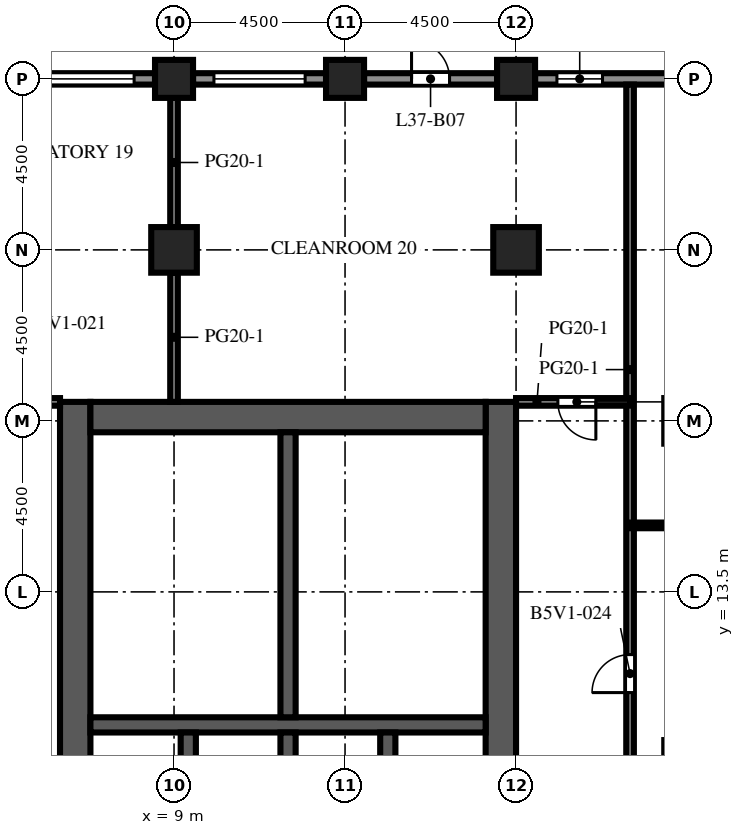
"""IFC4 building model, lengths in metres.
Left out: names, types, materials, properties, quantities, classifications, styles, units other than length and angle.
Written with IfcOpenShell. Run it as: python <this file> out.ifc"""

import sys

from ifc_helpers import new_model, si_unit, direction, frame, frame_2d, origin, origin_2d, place, context, subcontext, project, spatial, rectangle, extrude, element, fill, save


model = new_model("IFC4")
c1 = context("Model", 3, precision=1e-05, world=origin(), true_north=direction((0.0, 1.0)))
c2 = subcontext(c1, "Body", "Model", "MODEL_VIEW")
j1 = project(units=[si_unit("LENGTHUNIT", "METRE"), si_unit("PLANEANGLEUNIT", "RADIAN")], contexts=[c1])
p1 = place(None, origin())
s1 = spatial("IfcSite", under=j1, at=p1, CompositionType="ELEMENT")
p2 = place(p1, origin())
s2 = spatial("IfcBuilding", under=s1, at=p2, CompositionType="ELEMENT")
p3 = place(p2, frame((0.0, 0.0, 165.0)))
s3 = spatial("IfcBuildingStorey", under=s2, at=p3, CompositionType="ELEMENT", Elevation=165.0)
for number, where, z_axis, x_axis in (
    (1, (9.0, 27.0, 0.0), (0.0, 0.0, 1.0), (1.0, 0.0, 0.0)),
    (2, (13.5, 27.0, 0.0), (0.0, 0.0, 1.0), (1.0, 0.0, 0.0)),
    (3, (18.0, 27.0, 0.0), (0.0, 0.0, 1.0), (1.0, 0.0, 0.0)),
):
    element("IfcColumn", number, at=place(p3, frame(where, z_axis=z_axis, x_axis=x_axis)), inside=s3, PredefinedType="COLUMN", context=c2, shape_type="SweptSolid", body=[
        extrude(rectangle(XDim=1.0, YDim=1.0, at=origin_2d()), origin(), (0.0, 0.0, 1.0), 4.1),
    ])
for number, where, z_axis, x_axis in (
    (4, (9.0, 22.5, 0.0), (0.0, 0.0, 1.0), (1.0, 0.0, 0.0)),
    (5, (18.0, 22.5, 0.0), (0.0, 0.0, 1.0), (1.0, 0.0, 0.0)),
):
    element("IfcColumn", number, at=place(p3, frame(where, z_axis=z_axis, x_axis=x_axis)), inside=s3, PredefinedType="COLUMN", context=c2, shape_type="SweptSolid", body=[
        extrude(rectangle(XDim=1.2, YDim=1.2, at=origin_2d()), origin(), (0.0, 0.0, 1.0), 4.1),
    ])
p4 = place(p3, frame((6.4, -9.0, 0.0), z_axis=(0.0, 0.0, 1.0), x_axis=(0.0, 1.0, 0.0)))
e6 = element("IfcWall", 6, at=p4, inside=s3, PredefinedType="SHEAR", context=c2, shape_type="SweptSolid", body=[
    extrude(rectangle(XDim=27.5, YDim=0.8, at=frame_2d((13.75, 0.0))), origin(), (0.0, 0.0, 1.0), 4.1),
])
p5 = place(p4, frame((12.55, 0.0, 0.0)))
e7 = element("IfcOpeningElement", 7, at=p5, cuts=e6, PredefinedType="OPENING", context=c2, shape_type="SweptSolid", body=[
    extrude(rectangle(XDim=2.4, YDim=2.4, at=frame_2d((1.2, 1.2))), frame((0.0, 0.41, 0.0), z_axis=(0.0, -1.0, 0.0), x_axis=(1.0, 0.0, 0.0)), (0.0, 0.0, 1.0), 0.82),
])
p6 = place(p4, frame((3.95, 0.0, 0.0)))
e8 = element("IfcOpeningElement", 8, at=p6, cuts=e6, PredefinedType="OPENING", context=c2, shape_type="SweptSolid", body=[
    extrude(rectangle(XDim=1.2, YDim=2.1, at=frame_2d((0.6, 1.05))), frame((0.0, 0.41, 0.0), z_axis=(0.0, -1.0, 0.0), x_axis=(1.0, 0.0, 0.0)), (0.0, 0.0, 1.0), 0.82),
])
p7 = place(p4, frame((22.35, 0.0, 0.0)))
e9 = element("IfcOpeningElement", 9, at=p7, cuts=e6, PredefinedType="OPENING", context=c2, shape_type="SweptSolid", body=[
    extrude(rectangle(XDim=1.2, YDim=2.1, at=frame_2d((0.6, 1.05))), frame((0.0, 0.41, 0.0), z_axis=(0.0, -1.0, 0.0), x_axis=(1.0, 0.0, 0.0)), (0.0, 0.0, 1.0), 0.82),
])
p8 = place(p3, frame((17.6, -9.0, 0.0), z_axis=(0.0, 0.0, 1.0), x_axis=(0.0, 1.0, 0.0)))
e10 = element("IfcWall", 10, at=p8, inside=s3, PredefinedType="SHEAR", context=c2, shape_type="SweptSolid", body=[
    extrude(rectangle(XDim=27.5, YDim=0.8, at=frame_2d((13.75, 0.0))), origin(), (0.0, 0.0, 1.0), 4.1),
])
p9 = place(p8, frame((12.55, 0.0, 0.0)))
e11 = element("IfcOpeningElement", 11, at=p9, cuts=e10, PredefinedType="OPENING", context=c2, shape_type="SweptSolid", body=[
    extrude(rectangle(XDim=2.4, YDim=2.4, at=frame_2d((1.2, 1.2))), frame((0.0, 0.41, 0.0), z_axis=(0.0, -1.0, 0.0), x_axis=(1.0, 0.0, 0.0)), (0.0, 0.0, 1.0), 0.82),
])
p10 = place(p8, frame((6.825, 0.0, 0.0)))
e12 = element("IfcOpeningElement", 12, at=p10, cuts=e10, PredefinedType="OPENING", context=c2, shape_type="SweptSolid", body=[
    extrude(rectangle(XDim=1.2, YDim=2.1, at=frame_2d((0.6, 1.05))), frame((0.0, 0.41, 0.0), z_axis=(0.0, -1.0, 0.0), x_axis=(1.0, 0.0, 0.0)), (0.0, 0.0, 1.0), 0.82),
])
p11 = place(p8, frame((19.475, 0.0, 0.0)))
e13 = element("IfcOpeningElement", 13, at=p11, cuts=e10, PredefinedType="OPENING", context=c2, shape_type="SweptSolid", body=[
    extrude(rectangle(XDim=1.2, YDim=2.1, at=frame_2d((0.6, 1.05))), frame((0.0, 0.41, 0.0), z_axis=(0.0, -1.0, 0.0), x_axis=(1.0, 0.0, 0.0)), (0.0, 0.0, 1.0), 0.82),
])
p12 = place(p3, frame((6.8, 18.1, 0.0), z_axis=(0.0, 0.0, 1.0), x_axis=(1.0, 0.0, 0.0)))
e14 = element("IfcWall", 14, at=p12, inside=s3, PredefinedType="SHEAR", context=c2, shape_type="SweptSolid", body=[
    extrude(rectangle(XDim=10.4, YDim=0.8, at=frame_2d((5.2, 0.0))), origin(), (0.0, 0.0, 1.0), 4.1),
])
p13 = place(p3, frame((6.8, 10.0, 0.0), z_axis=(0.0, 0.0, 1.0), x_axis=(1.0, 0.0, 0.0)))
e15 = element("IfcWall", 15, at=p13, inside=s3, PredefinedType="SHEAR", context=c2, shape_type="SweptSolid", body=[
    extrude(rectangle(XDim=10.4, YDim=0.4, at=frame_2d((5.2, 0.0))), origin(), (0.0, 0.0, 1.0), 4.1),
])
for number, where, z_axis, x_axis in (
    (16, (9.375, 6.9, 0.0), (0.0, 0.0, 1.0), (0.0, 1.0, 0.0)),
    (17, (12.0, 6.9, 0.0), (0.0, 0.0, 1.0), (0.0, 1.0, 0.0)),
    (18, (14.625, 6.9, 0.0), (0.0, 0.0, 1.0), (0.0, 1.0, 0.0)),
):
    element("IfcWall", number, at=place(p3, frame(where, z_axis=z_axis, x_axis=x_axis)), inside=s3, PredefinedType="SHEAR", context=c2, shape_type="SweptSolid", body=[
        extrude(rectangle(XDim=2.9, YDim=0.4, at=frame_2d((1.45, 0.0))), origin(), (0.0, 0.0, 1.0), 4.1),
    ])
p14 = place(p3, frame((12.0, 10.2, 0.0), z_axis=(0.0, 0.0, 1.0), x_axis=(0.0, 1.0, 0.0)))
e19 = element("IfcWall", 19, at=p14, inside=s3, PredefinedType="SHEAR", context=c2, shape_type="SweptSolid", body=[
    extrude(rectangle(XDim=7.5, YDim=0.4, at=frame_2d((3.75, 0.0))), origin(), (0.0, 0.0, 1.0), 4.1),
])
p15 = place(p3, frame((18.5, 27.0, 0.0), z_axis=(0.0, 0.0, 1.0), x_axis=(1.0, 0.0, 0.0)))
e20 = element("IfcWall", 20, at=p15, inside=s3, PredefinedType="SOLIDWALL", context=c2, shape_type="SweptSolid", body=[
    extrude(rectangle(XDim=3.5, YDim=0.3, at=frame_2d((1.75, 0.0))), origin(), (0.0, 0.0, 1.0), 2.85),
])
p16 = place(p15, frame((0.575, 0.0, 0.8)))
e21 = element("IfcOpeningElement", 21, at=p16, cuts=e20, PredefinedType="OPENING", context=c2, shape_type="SweptSolid", body=[
    extrude(rectangle(XDim=1.2, YDim=1.7, at=frame_2d((0.6, 0.85))), frame((0.0, 0.16, 0.0), z_axis=(0.0, -1.0, 0.0), x_axis=(1.0, 0.0, 0.0)), (0.0, 0.0, 1.0), 0.32),
])
p17 = place(p3, frame((14.0, 27.0, 0.0), z_axis=(0.0, 0.0, 1.0), x_axis=(1.0, 0.0, 0.0)))
e22 = element("IfcWall", 22, at=p17, inside=s3, PredefinedType="SOLIDWALL", context=c2, shape_type="SweptSolid", body=[
    extrude(rectangle(XDim=3.5, YDim=0.3, at=frame_2d((1.75, 0.0))), origin(), (0.0, 0.0, 1.0), 2.85),
])
p18 = place(p17, frame((1.25, 0.0, 0.0)))
e23 = element("IfcOpeningElement", 23, at=p18, cuts=e22, PredefinedType="OPENING", context=c2, shape_type="SweptSolid", body=[
    extrude(rectangle(XDim=1.0, YDim=2.2, at=frame_2d((0.5, 1.1))), frame((0.0, 0.16, 0.0), z_axis=(0.0, -1.0, 0.0), x_axis=(1.0, 0.0, 0.0)), (0.0, 0.0, 1.0), 0.32),
])
p19 = place(p3, frame((9.5, 27.0, 0.0), z_axis=(0.0, 0.0, 1.0), x_axis=(1.0, 0.0, 0.0)))
e24 = element("IfcWall", 24, at=p19, inside=s3, PredefinedType="SOLIDWALL", context=c2, shape_type="SweptSolid", body=[
    extrude(rectangle(XDim=3.5, YDim=0.3, at=frame_2d((1.75, 0.0))), origin(), (0.0, 0.0, 1.0), 2.85),
])
p20 = place(p19, frame((0.55, 0.0, 0.8)))
e25 = element("IfcOpeningElement", 25, at=p20, cuts=e24, PredefinedType="OPENING", context=c2, shape_type="SweptSolid", body=[
    extrude(rectangle(XDim=2.4, YDim=1.7, at=frame_2d((1.2, 0.85))), frame((0.0, 0.16, 0.0), z_axis=(0.0, -1.0, 0.0), x_axis=(1.0, 0.0, 0.0)), (0.0, 0.0, 1.0), 0.32),
])
p21 = place(p3, frame((5.0, 27.0, 0.0), z_axis=(0.0, 0.0, 1.0), x_axis=(1.0, 0.0, 0.0)))
e26 = element("IfcWall", 26, at=p21, inside=s3, PredefinedType="SOLIDWALL", context=c2, shape_type="SweptSolid", body=[
    extrude(rectangle(XDim=3.5, YDim=0.3, at=frame_2d((1.75, 0.0))), origin(), (0.0, 0.0, 1.0), 2.85),
])
p22 = place(p21, frame((0.55, 0.0, 0.8)))
e27 = element("IfcOpeningElement", 27, at=p22, cuts=e26, PredefinedType="OPENING", context=c2, shape_type="SweptSolid", body=[
    extrude(rectangle(XDim=2.4, YDim=1.7, at=frame_2d((1.2, 0.85))), frame((0.0, 0.16, 0.0), z_axis=(0.0, -1.0, 0.0), x_axis=(1.0, 0.0, 0.0)), (0.0, 0.0, 1.0), 0.32),
])
p23 = place(p3, frame((8.2, 10.2, 0.0), z_axis=(0.0, 0.0, 1.0), x_axis=(0.0, 1.0, 0.0)))
e28 = element("IfcWall", 28, at=p23, inside=s3, PredefinedType="PARTITIONING", context=c2, shape_type="SweptSolid", body=[
    extrude(rectangle(XDim=2.25, YDim=0.1, at=frame_2d((1.125, 0.0))), origin(), (0.0, 0.0, 1.0), 3.65),
])
p24 = place(p23, frame((0.625, 0.0, 0.0)))
e29 = element("IfcOpeningElement", 29, at=p24, cuts=e28, PredefinedType="OPENING", context=c2, shape_type="SweptSolid", body=[
    extrude(rectangle(XDim=1.0, YDim=2.1, at=frame_2d((0.5, 1.05))), frame((0.0, 0.06, 0.0), z_axis=(0.0, -1.0, 0.0), x_axis=(1.0, 0.0, 0.0)), (0.0, 0.0, 1.0), 0.12),
])
p25 = place(p3, frame((8.2, 12.45, 0.0), z_axis=(0.0, 0.0, 1.0), x_axis=(0.0, 1.0, 0.0)))
e30 = element("IfcWall", 30, at=p25, inside=s3, PredefinedType="PARTITIONING", context=c2, shape_type="SweptSolid", body=[
    extrude(rectangle(XDim=2.4, YDim=0.1, at=frame_2d((1.2, 0.0))), origin(), (0.0, 0.0, 1.0), 3.65),
])
p26 = place(p25, frame((0.7, 0.0, 0.0)))
e31 = element("IfcOpeningElement", 31, at=p26, cuts=e30, PredefinedType="OPENING", context=c2, shape_type="SweptSolid", body=[
    extrude(rectangle(XDim=1.0, YDim=2.1, at=frame_2d((0.5, 1.05))), frame((0.0, 0.06, 0.0), z_axis=(0.0, -1.0, 0.0), x_axis=(1.0, 0.0, 0.0)), (0.0, 0.0, 1.0), 0.12),
])
p27 = place(p3, frame((8.2, 14.85, 0.0), z_axis=(0.0, 0.0, 1.0), x_axis=(0.0, 1.0, 0.0)))
e32 = element("IfcWall", 32, at=p27, inside=s3, PredefinedType="PARTITIONING", context=c2, shape_type="SweptSolid", body=[
    extrude(rectangle(XDim=2.85, YDim=0.1, at=frame_2d((1.425, 0.0))), origin(), (0.0, 0.0, 1.0), 3.65),
])
p28 = place(p27, frame((0.925, 0.0, 0.0)))
e33 = element("IfcOpeningElement", 33, at=p28, cuts=e32, PredefinedType="OPENING", context=c2, shape_type="SweptSolid", body=[
    extrude(rectangle(XDim=1.0, YDim=2.1, at=frame_2d((0.5, 1.05))), frame((0.0, 0.06, 0.0), z_axis=(0.0, -1.0, 0.0), x_axis=(1.0, 0.0, 0.0)), (0.0, 0.0, 1.0), 0.12),
])
for number, where, z_axis, x_axis in (
    (34, (8.2, 12.45, 0.0), (0.0, 0.0, 1.0), (1.0, 0.0, 0.0)),
    (35, (8.2, 14.85, 0.0), (0.0, 0.0, 1.0), (1.0, 0.0, 0.0)),
):
    element("IfcWall", number, at=place(p3, frame(where, z_axis=z_axis, x_axis=x_axis)), inside=s3, PredefinedType="PARTITIONING", context=c2, shape_type="SweptSolid", body=[
        extrude(rectangle(XDim=3.6, YDim=0.1, at=frame_2d((1.8, 0.0))), origin(), (0.0, 0.0, 1.0), 3.65),
    ])
for number, where, z_axis, x_axis in (
    (36, (9.0, 18.5, 0.0), (0.0, 0.0, 1.0), (0.0, 1.0, 0.0)),
    (37, (9.0, 23.1, 0.0), (0.0, 0.0, 1.0), (0.0, 1.0, 0.0)),
):
    element("IfcWall", number, at=place(p3, frame(where, z_axis=z_axis, x_axis=x_axis)), inside=s3, PredefinedType="PARTITIONING", context=c2, shape_type="SweptSolid", body=[
        extrude(rectangle(XDim=3.4, YDim=0.2, at=frame_2d((1.7, 0.0))), origin(), (0.0, 0.0, 1.0), 3.65),
    ])
p29 = place(p3, frame((21.0, 26.85, 0.0), z_axis=(0.0, 0.0, 1.0), x_axis=(0.0, -1.0, 0.0)))
e38 = element("IfcWall", 38, at=p29, inside=s3, PredefinedType="PARTITIONING", context=c2, shape_type="SweptSolid", body=[
    extrude(rectangle(XDim=20.6, YDim=0.2, at=frame_2d((10.3, 0.0))), origin(), (0.0, 0.0, 1.0), 3.65),
])
p30 = place(p29, frame((15.0, 0.0, 0.0)))
e39 = element("IfcOpeningElement", 39, at=p30, cuts=e38, PredefinedType="OPENING", context=c2, shape_type="SweptSolid", body=[
    extrude(rectangle(XDim=1.0, YDim=2.1, at=frame_2d((0.5, 1.05))), frame((0.0, 0.11, 0.0), z_axis=(0.0, -1.0, 0.0), x_axis=(1.0, 0.0, 0.0)), (0.0, 0.0, 1.0), 0.22),
])
p31 = place(p3, frame((21.0, 15.25, 0.0), z_axis=(0.0, 0.0, 1.0), x_axis=(1.0, 0.0, 0.0)))
e40 = element("IfcWall", 40, at=p31, inside=s3, PredefinedType="PARTITIONING", context=c2, shape_type="SweptSolid", body=[
    extrude(rectangle(XDim=5.85, YDim=0.15, at=frame_2d((2.925, 0.0))), origin(), (0.0, 0.0, 1.0), 3.65),
])
p32 = place(p31, frame((3.1, 0.0, 0.0)))
e41 = element("IfcOpeningElement", 41, at=p32, cuts=e40, PredefinedType="OPENING", context=c2, shape_type="SweptSolid", body=[
    extrude(rectangle(XDim=1.0, YDim=2.1, at=frame_2d((0.5, 1.05))), frame((0.0, 0.085, 0.0), z_axis=(0.0, -1.0, 0.0), x_axis=(1.0, 0.0, 0.0)), (0.0, 0.0, 1.0), 0.17),
])
p33 = place(p3, frame((1.5, 18.5, 0.0), z_axis=(0.0, 0.0, 1.0), x_axis=(1.0, 0.0, 0.0)))
e42 = element("IfcWall", 42, at=p33, inside=s3, PredefinedType="PARTITIONING", context=c2, shape_type="SweptSolid", body=[
    extrude(rectangle(XDim=4.5, YDim=0.2, at=frame_2d((2.25, 0.0))), origin(), (0.0, 0.0, 1.0), 3.65),
])
p34 = place(p33, frame((2.1, 0.0, 0.0)))
e43 = element("IfcOpeningElement", 43, at=p34, cuts=e42, PredefinedType="OPENING", context=c2, shape_type="SweptSolid", body=[
    extrude(rectangle(XDim=1.0, YDim=2.1, at=frame_2d((0.5, 1.05))), frame((0.0, 0.11, 0.0), z_axis=(0.0, -1.0, 0.0), x_axis=(1.0, 0.0, 0.0)), (0.0, 0.0, 1.0), 0.22),
])
p35 = place(p3, frame((18.0, 18.5, 0.0), z_axis=(0.0, 0.0, 1.0), x_axis=(1.0, 0.0, 0.0)))
e44 = element("IfcWall", 44, at=p35, inside=s3, PredefinedType="PARTITIONING", context=c2, shape_type="SweptSolid", body=[
    extrude(rectangle(XDim=3.0, YDim=0.2, at=frame_2d((1.5, 0.0))), origin(), (0.0, 0.0, 1.0), 3.65),
])
p36 = place(p35, frame((1.1, 0.0, 0.0)))
e45 = element("IfcOpeningElement", 45, at=p36, cuts=e44, PredefinedType="OPENING", context=c2, shape_type="SweptSolid", body=[
    extrude(rectangle(XDim=1.0, YDim=2.1, at=frame_2d((0.5, 1.05))), frame((0.0, 0.11, 0.0), z_axis=(0.0, -1.0, 0.0), x_axis=(1.0, 0.0, 0.0)), (0.0, 0.0, 1.0), 0.22),
])
p37 = place(p16, origin())
e46 = element("IfcWindow", 46, at=p37, inside=s3, PartitioningType="SINGLE_PANEL", PredefinedType="WINDOW", context=c2, shape_type="SweptSolid", body=[
    extrude(rectangle(XDim=1.2, YDim=1.7, at=frame_2d((0.6, 0.85))), frame((0.0, 0.03, 0.0), z_axis=(0.0, -1.0, 0.0), x_axis=(1.0, 0.0, 0.0)), (0.0, 0.0, 1.0), 0.06),
])
fill(e21, e46)
p38 = place(p18, origin())
e47 = element("IfcDoor", 47, at=p38, inside=s3, OperationType="SINGLE_SWING_LEFT", PredefinedType="DOOR", context=c2, shape_type="SweptSolid", body=[
    extrude(rectangle(XDim=1.0, YDim=2.2, at=frame_2d((0.5, 1.1))), frame((0.0, 0.025, 0.0), z_axis=(0.0, -1.0, 0.0), x_axis=(1.0, 0.0, 0.0)), (0.0, 0.0, 1.0), 0.05),
])
fill(e23, e47)
p39 = place(p20, origin())
e48 = element("IfcWindow", 48, at=p39, inside=s3, PartitioningType="SINGLE_PANEL", PredefinedType="WINDOW", context=c2, shape_type="SweptSolid", body=[
    extrude(rectangle(XDim=2.4, YDim=1.7, at=frame_2d((1.2, 0.85))), frame((0.0, 0.03, 0.0), z_axis=(0.0, -1.0, 0.0), x_axis=(1.0, 0.0, 0.0)), (0.0, 0.0, 1.0), 0.06),
])
fill(e25, e48)
p40 = place(p22, origin())
e49 = element("IfcWindow", 49, at=p40, inside=s3, PartitioningType="SINGLE_PANEL", PredefinedType="WINDOW", context=c2, shape_type="SweptSolid", body=[
    extrude(rectangle(XDim=2.4, YDim=1.7, at=frame_2d((1.2, 0.85))), frame((0.0, 0.03, 0.0), z_axis=(0.0, -1.0, 0.0), x_axis=(1.0, 0.0, 0.0)), (0.0, 0.0, 1.0), 0.06),
])
fill(e27, e49)
p41 = place(p11, frame((1.2, 0.0, 0.0), z_axis=(0.0, 0.0, 1.0), x_axis=(-1.0, 0.0, 0.0)))
e50 = element("IfcDoor", 50, at=p41, inside=s3, OperationType="SINGLE_SWING_LEFT", PredefinedType="DOOR", context=c2, shape_type="SweptSolid", body=[
    extrude(rectangle(XDim=1.2, YDim=2.1, at=frame_2d((0.6, 1.05))), frame((0.0, 0.025, 0.0), z_axis=(0.0, -1.0, 0.0), x_axis=(1.0, 0.0, 0.0)), (0.0, 0.0, 1.0), 0.05),
])
fill(e13, e50)
p42 = place(p7, origin())
e51 = element("IfcDoor", 51, at=p42, inside=s3, OperationType="SINGLE_SWING_RIGHT", PredefinedType="DOOR", context=c2, shape_type="SweptSolid", body=[
    extrude(rectangle(XDim=1.2, YDim=2.1, at=frame_2d((0.6, 1.05))), frame((0.0, -0.325, 0.0), z_axis=(0.0, -1.0, 0.0), x_axis=(1.0, 0.0, 0.0)), (0.0, 0.0, 1.0), 0.05),
])
fill(e9, e51)
p43 = place(p24, origin())
e52 = element("IfcDoor", 52, at=p43, inside=s3, OperationType="SINGLE_SWING_LEFT", PredefinedType="DOOR", context=c2, shape_type="SweptSolid", body=[
    extrude(rectangle(XDim=1.0, YDim=2.1, at=frame_2d((0.5, 1.05))), frame((0.0, 0.025, 0.0), z_axis=(0.0, -1.0, 0.0), x_axis=(1.0, 0.0, 0.0)), (0.0, 0.0, 1.0), 0.05),
])
fill(e29, e52)
p44 = place(p26, origin())
e53 = element("IfcDoor", 53, at=p44, inside=s3, OperationType="SINGLE_SWING_RIGHT", PredefinedType="DOOR", context=c2, shape_type="SweptSolid", body=[
    extrude(rectangle(XDim=1.0, YDim=2.1, at=frame_2d((0.5, 1.05))), frame((0.0, 0.025, 0.0), z_axis=(0.0, -1.0, 0.0), x_axis=(1.0, 0.0, 0.0)), (0.0, 0.0, 1.0), 0.05),
])
fill(e31, e53)
p45 = place(p28, origin())
e54 = element("IfcDoor", 54, at=p45, inside=s3, OperationType="SINGLE_SWING_LEFT", PredefinedType="DOOR", context=c2, shape_type="SweptSolid", body=[
    extrude(rectangle(XDim=1.0, YDim=2.1, at=frame_2d((0.5, 1.05))), frame((0.0, 0.025, 0.0), z_axis=(0.0, -1.0, 0.0), x_axis=(1.0, 0.0, 0.0)), (0.0, 0.0, 1.0), 0.05),
])
fill(e33, e54)
p46 = place(p36, origin())
e55 = element("IfcDoor", 55, at=p46, inside=s3, OperationType="SINGLE_SWING_RIGHT", PredefinedType="DOOR", context=c2, shape_type="SweptSolid", body=[
    extrude(rectangle(XDim=1.0, YDim=2.1, at=frame_2d((0.5, 1.05))), frame((0.0, 0.025, 0.0), z_axis=(0.0, -1.0, 0.0), x_axis=(1.0, 0.0, 0.0)), (0.0, 0.0, 1.0), 0.05),
])
fill(e45, e55)
p47 = place(p30, origin())
e56 = element("IfcDoor", 56, at=p47, inside=s3, OperationType="SINGLE_SWING_RIGHT", PredefinedType="DOOR", context=c2, shape_type="SweptSolid", body=[
    extrude(rectangle(XDim=1.0, YDim=2.1, at=frame_2d((0.5, 1.05))), frame((0.0, 0.025, 0.0), z_axis=(0.0, -1.0, 0.0), x_axis=(1.0, 0.0, 0.0)), (0.0, 0.0, 1.0), 0.05),
])
fill(e39, e56)
save(model, sys.argv[1])
